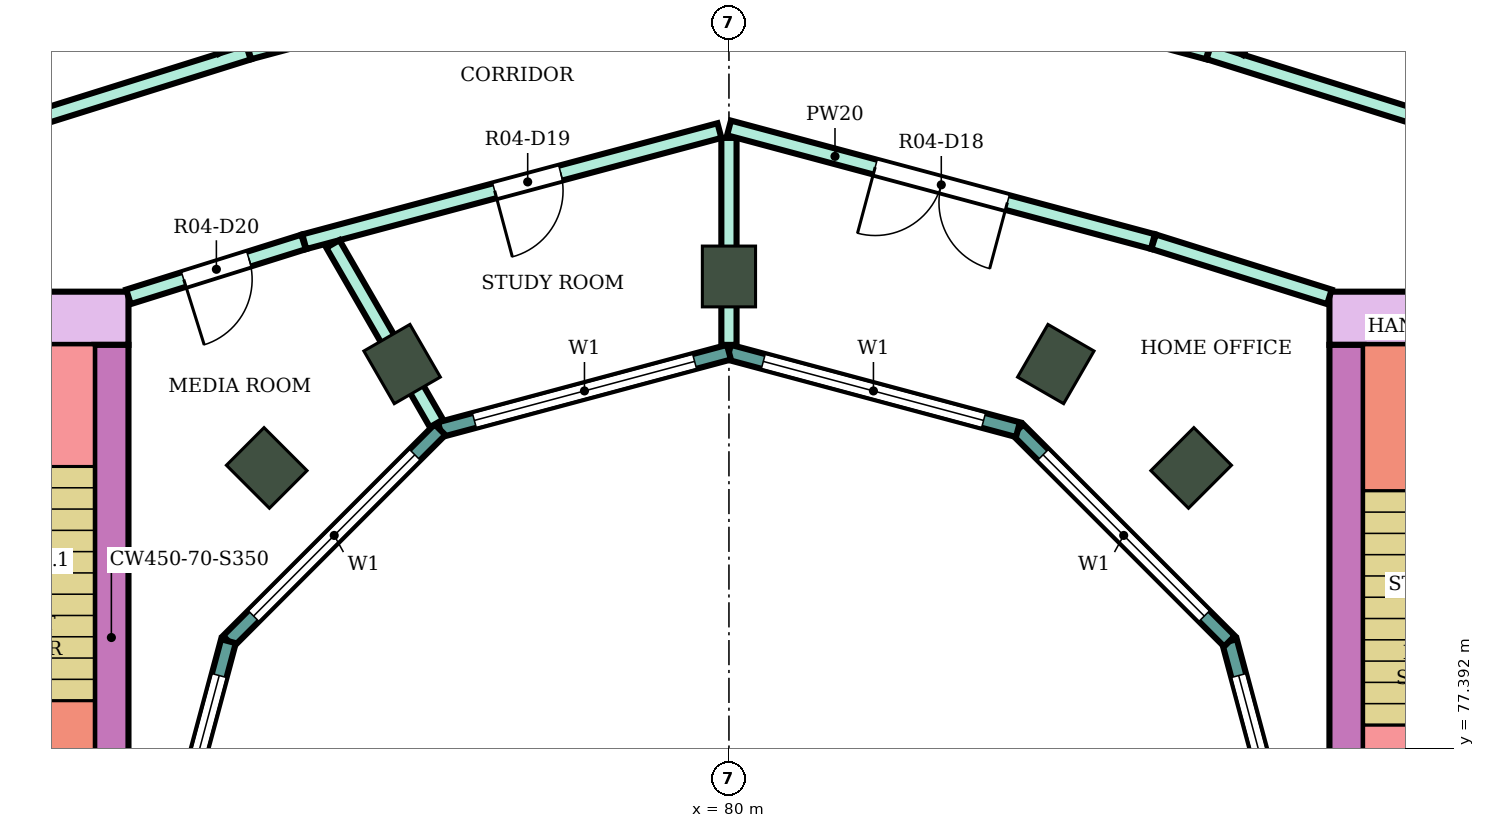
"""IFC4 building model, lengths in metres.
Left out: names, types, materials, properties, quantities, classifications, styles, units other than length and angle.
Written with IfcOpenShell. Run it as: python <this file> out.ifc"""

import sys

from ifc_helpers import new_model, si_unit, direction, frame, frame_2d, origin, origin_2d, place, context, subcontext, project, spatial, rectangle, extrude, element, fill, save


model = new_model("IFC4")
c1 = context("Model", 3, precision=1e-05, world=origin(), true_north=direction((0.0, 1.0)))
c2 = subcontext(c1, "Body", "Model", "MODEL_VIEW")
j1 = project(units=[si_unit("LENGTHUNIT", "METRE"), si_unit("PLANEANGLEUNIT", "RADIAN")], contexts=[c1])
p1 = place(None, origin())
s1 = spatial("IfcSite", under=j1, at=p1, CompositionType="ELEMENT")
p2 = place(p1, origin())
s2 = spatial("IfcBuilding", under=s1, at=p2, CompositionType="ELEMENT")
p3 = place(p2, frame((0.0, 0.0, 202.8)))
s3 = spatial("IfcBuildingStorey", under=s2, at=p3, CompositionType="ELEMENT", Elevation=202.8)
for number, where, z_axis, x_axis in (
    (1, (86.081, 81.081, 0.0), (0.0, 0.0, 1.0), (0.707, 0.707, 0.0)),
    (2, (84.3, 82.448, 0.0), (0.0, 0.0, 1.0), (0.5, 0.866, 0.0)),
    (3, (80.0, 83.6, 0.0), (0.0, 0.0, 1.0), (0.0, 1.0, 0.0)),
    (4, (75.7, 82.448, 0.0), (0.0, 0.0, 1.0), (-0.5, 0.866, 0.0)),
    (5, (73.919, 81.081, 0.0), (0.0, 0.0, 1.0), (-0.707, 0.707, 0.0)),
):
    element("IfcColumn", number, at=place(p3, frame(where, z_axis=z_axis, x_axis=x_axis)), inside=s3, PredefinedType="COLUMN", context=c2, shape_type="SweptSolid", body=[
        extrude(rectangle(XDim=0.8, YDim=0.7, at=origin_2d()), origin(), (0.0, 0.0, 1.0), 4.1),
    ])
p4 = place(p3, frame((87.9, 83.05, 0.0), z_axis=(0.0, 0.0, 1.0), x_axis=(1.0, 0.0, 0.0)))
e6 = element("IfcWall", 6, at=p4, inside=s3, PredefinedType="SHEAR", context=c2, shape_type="SweptSolid", body=[
    extrude(rectangle(XDim=14.8, YDim=0.7, at=frame_2d((7.4, 0.0))), origin(), (0.0, 0.0, 1.0), 3.75),
])
p5 = place(p4, frame((4.2, 0.0, 0.0)))
e7 = element("IfcOpeningElement", 7, at=p5, cuts=e6, PredefinedType="OPENING", context=c2, shape_type="SweptSolid", body=[
    extrude(rectangle(XDim=2.4, YDim=2.4, at=frame_2d((1.2, 1.2))), frame((0.0, 0.36, 0.0), z_axis=(0.0, -1.0, 0.0), x_axis=(1.0, 0.0, 0.0)), (0.0, 0.0, 1.0), 0.72),
])
p6 = place(p3, frame((88.125, 75.0, 0.0), z_axis=(0.0, 0.0, 1.0), x_axis=(0.0, 1.0, 0.0)))
e8 = element("IfcWall", 8, at=p6, inside=s3, PredefinedType="SHEAR", context=c2, shape_type="SweptSolid", body=[
    extrude(rectangle(XDim=7.7, YDim=0.45, at=frame_2d((3.85, 0.0))), origin(), (0.0, 0.0, 1.0), 3.75),
])
p7 = place(p3, frame((72.1, 83.05, 0.0), z_axis=(0.0, 0.0, 1.0), x_axis=(-1.0, 0.0, 0.0)))
e9 = element("IfcWall", 9, at=p7, inside=s3, PredefinedType="SHEAR", context=c2, shape_type="SweptSolid", body=[
    extrude(rectangle(XDim=14.8, YDim=0.7, at=frame_2d((7.4, 0.0))), origin(), (0.0, 0.0, 1.0), 3.75),
])
p8 = place(p7, frame((4.2, 0.0, 0.0)))
e10 = element("IfcOpeningElement", 10, at=p8, cuts=e9, PredefinedType="OPENING", context=c2, shape_type="SweptSolid", body=[
    extrude(rectangle(XDim=2.4, YDim=2.4, at=frame_2d((1.2, 1.2))), frame((0.0, 0.36, 0.0), z_axis=(0.0, -1.0, 0.0), x_axis=(1.0, 0.0, 0.0)), (0.0, 0.0, 1.0), 0.72),
])
p9 = place(p3, frame((71.875, 82.7, 0.0), z_axis=(0.0, 0.0, 1.0), x_axis=(0.0, -1.0, 0.0)))
e11 = element("IfcWall", 11, at=p9, inside=s3, PredefinedType="SHEAR", context=c2, shape_type="SweptSolid", body=[
    extrude(rectangle(XDim=7.7, YDim=0.45, at=frame_2d((3.85, 0.0))), origin(), (0.0, 0.0, 1.0), 3.75),
])
p10 = place(p3, frame((87.604, 75.0, 0.0), z_axis=(0.0, 0.0, 1.0), x_axis=(-0.258789828301, 0.965933654434, 0.0)))
e12 = element("IfcWall", 12, at=p10, inside=s3, PredefinedType="NOTDEFINED", context=c2, shape_type="SweptSolid", body=[
    extrude(rectangle(XDim=3.936, YDim=0.2, at=frame_2d((1.968, 0.0))), origin(), (0.0, 0.0, 1.0), 4.1),
])
p11 = place(p10, frame((0.468, 0.0, 0.9)))
e13 = element("IfcOpeningElement", 13, at=p11, cuts=e12, PredefinedType="OPENING", context=c2, shape_type="SweptSolid", body=[
    extrude(rectangle(XDim=3.0, YDim=2.3, at=frame_2d((1.5, 1.15))), frame((0.0, 0.11, 0.0), z_axis=(0.0, -1.0, 0.0), x_axis=(1.0, 0.0, 0.0)), (0.0, 0.0, 1.0), 0.22),
])
p12 = place(p3, frame((86.585, 78.802, 0.0), z_axis=(0.0, 0.0, 1.0), x_axis=(-0.707106781187, 0.707106781187, 0.0)))
e14 = element("IfcWall", 14, at=p12, inside=s3, PredefinedType="NOTDEFINED", context=c2, shape_type="SweptSolid", body=[
    extrude(rectangle(XDim=3.936, YDim=0.2, at=frame_2d((1.968, 0.0))), origin(), (0.0, 0.0, 1.0), 4.1),
])
p13 = place(p12, frame((0.468, 0.0, 0.9)))
e15 = element("IfcOpeningElement", 15, at=p13, cuts=e14, PredefinedType="OPENING", context=c2, shape_type="SweptSolid", body=[
    extrude(rectangle(XDim=3.0, YDim=2.3, at=frame_2d((1.5, 1.15))), frame((0.0, 0.11, 0.0), z_axis=(0.0, -1.0, 0.0), x_axis=(1.0, 0.0, 0.0)), (0.0, 0.0, 1.0), 0.22),
])
p14 = place(p3, frame((83.802, 81.585, 0.0), z_axis=(0.0, 0.0, 1.0), x_axis=(-0.965933654434, 0.258789828301, 0.0)))
e16 = element("IfcWall", 16, at=p14, inside=s3, PredefinedType="NOTDEFINED", context=c2, shape_type="SweptSolid", body=[
    extrude(rectangle(XDim=3.936, YDim=0.2, at=frame_2d((1.968, 0.0))), origin(), (0.0, 0.0, 1.0), 4.1),
])
p15 = place(p14, frame((0.468, 0.0, 0.9)))
e17 = element("IfcOpeningElement", 17, at=p15, cuts=e16, PredefinedType="OPENING", context=c2, shape_type="SweptSolid", body=[
    extrude(rectangle(XDim=3.0, YDim=2.3, at=frame_2d((1.5, 1.15))), frame((0.0, 0.11, 0.0), z_axis=(0.0, -1.0, 0.0), x_axis=(1.0, 0.0, 0.0)), (0.0, 0.0, 1.0), 0.22),
])
p16 = place(p3, frame((80.0, 82.604, 0.0), z_axis=(0.0, 0.0, 1.0), x_axis=(-0.965933654434, -0.258789828301, 0.0)))
e18 = element("IfcWall", 18, at=p16, inside=s3, PredefinedType="NOTDEFINED", context=c2, shape_type="SweptSolid", body=[
    extrude(rectangle(XDim=3.936, YDim=0.2, at=frame_2d((1.968, 0.0))), origin(), (0.0, 0.0, 1.0), 4.1),
])
p17 = place(p16, frame((0.468, 0.0, 0.9)))
e19 = element("IfcOpeningElement", 19, at=p17, cuts=e18, PredefinedType="OPENING", context=c2, shape_type="SweptSolid", body=[
    extrude(rectangle(XDim=3.0, YDim=2.3, at=frame_2d((1.5, 1.15))), frame((0.0, 0.11, 0.0), z_axis=(0.0, -1.0, 0.0), x_axis=(1.0, 0.0, 0.0)), (0.0, 0.0, 1.0), 0.22),
])
p18 = place(p3, frame((76.198, 81.585, 0.0), z_axis=(0.0, 0.0, 1.0), x_axis=(-0.707106781187, -0.707106781187, 0.0)))
e20 = element("IfcWall", 20, at=p18, inside=s3, PredefinedType="NOTDEFINED", context=c2, shape_type="SweptSolid", body=[
    extrude(rectangle(XDim=3.936, YDim=0.2, at=frame_2d((1.968, 0.0))), origin(), (0.0, 0.0, 1.0), 4.1),
])
p19 = place(p18, frame((0.468, 0.0, 0.9)))
e21 = element("IfcOpeningElement", 21, at=p19, cuts=e20, PredefinedType="OPENING", context=c2, shape_type="SweptSolid", body=[
    extrude(rectangle(XDim=3.0, YDim=2.3, at=frame_2d((1.5, 1.15))), frame((0.0, 0.11, 0.0), z_axis=(0.0, -1.0, 0.0), x_axis=(1.0, 0.0, 0.0)), (0.0, 0.0, 1.0), 0.22),
])
p20 = place(p3, frame((73.415, 78.802, 0.0), z_axis=(0.0, 0.0, 1.0), x_axis=(-0.258789828301, -0.965933654434, 0.0)))
e22 = element("IfcWall", 22, at=p20, inside=s3, PredefinedType="NOTDEFINED", context=c2, shape_type="SweptSolid", body=[
    extrude(rectangle(XDim=3.936, YDim=0.2, at=frame_2d((1.968, 0.0))), origin(), (0.0, 0.0, 1.0), 4.1),
])
p21 = place(p20, frame((0.468, 0.0, 0.9)))
e23 = element("IfcOpeningElement", 23, at=p21, cuts=e22, PredefinedType="OPENING", context=c2, shape_type="SweptSolid", body=[
    extrude(rectangle(XDim=3.0, YDim=2.3, at=frame_2d((1.5, 1.15))), frame((0.0, 0.11, 0.0), z_axis=(0.0, -1.0, 0.0), x_axis=(1.0, 0.0, 0.0)), (0.0, 0.0, 1.0), 0.22),
])
p22 = place(p3, frame((68.2, 84.834, 0.0), z_axis=(0.0, 0.0, 1.0), x_axis=(0.954272398161, 0.298938438661, 0.0)))
e24 = element("IfcWall", 24, at=p22, inside=s3, PredefinedType="PARTITIONING", context=c2, shape_type="SweptSolid", body=[
    extrude(rectangle(XDim=5.74, YDim=0.2, at=frame_2d((2.87, 0.0))), origin(), (0.0, 0.0, 1.0), 3.65),
])
p23 = place(p3, frame((72.1, 83.332, 0.0), z_axis=(0.0, 0.0, 1.0), x_axis=(0.954233106619, 0.299063836383, 0.0)))
e25 = element("IfcWall", 25, at=p23, inside=s3, PredefinedType="PARTITIONING", context=c2, shape_type="SweptSolid", body=[
    extrude(rectangle(XDim=2.414, YDim=0.2, at=frame_2d((1.207, 0.0))), origin(), (0.0, 0.0, 1.0), 3.65),
])
p24 = place(p23, frame((0.762, 0.0, 0.0)))
e26 = element("IfcOpeningElement", 26, at=p24, cuts=e25, PredefinedType="OPENING", context=c2, shape_type="SweptSolid", body=[
    extrude(rectangle(XDim=0.9, YDim=2.1, at=frame_2d((0.45, 1.05))), frame((0.0, 0.11, 0.0), z_axis=(0.0, -1.0, 0.0), x_axis=(1.0, 0.0, 0.0)), (0.0, 0.0, 1.0), 0.22),
])
p25 = place(p3, frame((73.687, 86.554, 0.0), z_axis=(0.0, 0.0, 1.0), x_axis=(0.96595258731, 0.258719150952, 0.0)))
e27 = element("IfcWall", 27, at=p25, inside=s3, PredefinedType="PARTITIONING", context=c2, shape_type="SweptSolid", body=[
    extrude(rectangle(XDim=6.486, YDim=0.2, at=frame_2d((3.243, 0.0))), origin(), (0.0, 0.0, 1.0), 3.65),
])
p26 = place(p25, frame((0.55, 0.0, 0.0)))
e28 = element("IfcOpeningElement", 28, at=p26, cuts=e27, PredefinedType="OPENING", context=c2, shape_type="SweptSolid", body=[
    extrude(rectangle(XDim=1.0, YDim=2.1, at=frame_2d((0.5, 1.05))), frame((0.0, 0.11, 0.0), z_axis=(0.0, -1.0, 0.0), x_axis=(1.0, 0.0, 0.0)), (0.0, 0.0, 1.0), 0.22),
])
p27 = place(p3, frame((74.413, 84.057, 0.0), z_axis=(0.0, 0.0, 1.0), x_axis=(0.965972135939, 0.258646153246, 0.0)))
e29 = element("IfcWall", 29, at=p27, inside=s3, PredefinedType="PARTITIONING", context=c2, shape_type="SweptSolid", body=[
    extrude(rectangle(XDim=5.654, YDim=0.2, at=frame_2d((2.827, 0.0))), origin(), (0.0, 0.0, 1.0), 3.65),
])
p28 = place(p27, frame((2.593, 0.0, 0.0)))
e30 = element("IfcOpeningElement", 30, at=p28, cuts=e29, PredefinedType="OPENING", context=c2, shape_type="SweptSolid", body=[
    extrude(rectangle(XDim=0.9, YDim=2.1, at=frame_2d((0.45, 1.05))), frame((0.0, 0.11, 0.0), z_axis=(0.0, -1.0, 0.0), x_axis=(1.0, 0.0, 0.0)), (0.0, 0.0, 1.0), 0.22),
])
p29 = place(p3, frame((74.789, 84.028, 0.0), z_axis=(0.0, 0.0, 1.0), x_axis=(0.49993436518, -0.866063294749, 0.0)))
e31 = element("IfcWall", 31, at=p29, inside=s3, PredefinedType="PARTITIONING", context=c2, shape_type="SweptSolid", body=[
    extrude(rectangle(XDim=2.726, YDim=0.2, at=frame_2d((1.363, 0.0))), origin(), (0.0, 0.0, 1.0), 3.65),
])
p30 = place(p3, frame((80.0, 82.7, 0.0), z_axis=(0.0, 0.0, 1.0), x_axis=(0.0, 1.0, 0.0)))
e32 = element("IfcWall", 32, at=p30, inside=s3, PredefinedType="PARTITIONING", context=c2, shape_type="SweptSolid", body=[
    extrude(rectangle(XDim=2.723, YDim=0.2, at=frame_2d((1.362, 0.0))), origin(), (0.0, 0.0, 1.0), 3.65),
])
p31 = place(p3, frame((80.048, 88.233, 0.0), z_axis=(0.0, 0.0, 1.0), x_axis=(0.965787353661, -0.259335280109, 0.0)))
e33 = element("IfcWall", 33, at=p31, inside=s3, PredefinedType="PARTITIONING", context=c2, shape_type="SweptSolid", body=[
    extrude(rectangle(XDim=6.476, YDim=0.2, at=frame_2d((3.238, 0.0))), origin(), (0.0, 0.0, 1.0), 3.65),
])
p32 = place(p31, frame((4.936, 0.0, 0.0)))
e34 = element("IfcOpeningElement", 34, at=p32, cuts=e33, PredefinedType="OPENING", context=c2, shape_type="SweptSolid", body=[
    extrude(rectangle(XDim=1.0, YDim=2.1, at=frame_2d((0.5, 1.05))), frame((0.0, 0.11, 0.0), z_axis=(0.0, -1.0, 0.0), x_axis=(1.0, 0.0, 0.0)), (0.0, 0.0, 1.0), 0.22),
])
p33 = place(p3, frame((80.001, 85.554, 0.0), z_axis=(0.0, 0.0, 1.0), x_axis=(0.965917658836, -0.258849524528, 0.0)))
e35 = element("IfcWall", 35, at=p33, inside=s3, PredefinedType="PARTITIONING", context=c2, shape_type="SweptSolid", body=[
    extrude(rectangle(XDim=5.773, YDim=0.2, at=frame_2d((2.887, 0.0))), origin(), (0.0, 0.0, 1.0), 3.65),
])
p34 = place(p33, frame((1.991, 0.0, 0.0)))
e36 = element("IfcOpeningElement", 36, at=p34, cuts=e35, PredefinedType="OPENING", context=c2, shape_type="SweptSolid", body=[
    extrude(rectangle(XDim=1.8, YDim=2.1, at=frame_2d((0.9, 1.05))), frame((0.0, 0.11, 0.0), z_axis=(0.0, -1.0, 0.0), x_axis=(1.0, 0.0, 0.0)), (0.0, 0.0, 1.0), 0.22),
])
p35 = place(p3, frame((85.587, 84.057, 0.0), z_axis=(0.0, 0.0, 1.0), x_axis=(0.954210767728, -0.299135104513, 0.0)))
e37 = element("IfcWall", 37, at=p35, inside=s3, PredefinedType="PARTITIONING", context=c2, shape_type="SweptSolid", body=[
    extrude(rectangle(XDim=2.424, YDim=0.2, at=frame_2d((1.212, 0.0))), origin(), (0.0, 0.0, 1.0), 3.65),
])
p36 = place(p3, frame((86.313, 86.554, 0.0), z_axis=(0.0, 0.0, 1.0), x_axis=(0.954081217458, -0.299548043717, 0.0)))
e38 = element("IfcWall", 38, at=p36, inside=s3, PredefinedType="PARTITIONING", context=c2, shape_type="SweptSolid", body=[
    extrude(rectangle(XDim=5.721, YDim=0.2, at=frame_2d((2.86, 0.0))), origin(), (0.0, 0.0, 1.0), 3.65),
])
p37 = place(p3, frame((86.676, 86.563, 0.0), z_axis=(0.0, 0.0, 1.0), x_axis=(0.500124310661, 0.865953621094, 0.0)))
e39 = element("IfcWall", 39, at=p37, inside=s3, PredefinedType="PARTITIONING", context=c2, shape_type="SweptSolid", body=[
    extrude(rectangle(XDim=12.446, YDim=0.2, at=frame_2d((6.223, 0.0))), origin(), (0.0, 0.0, 1.0), 3.65),
])
p38 = place(p3, frame((67.101, 97.342, 0.0), z_axis=(0.0, 0.0, 1.0), x_axis=(0.499944152966, -0.866057644684, 0.0)))
e40 = element("IfcWall", 40, at=p38, inside=s3, PredefinedType="PARTITIONING", context=c2, shape_type="SweptSolid", body=[
    extrude(rectangle(XDim=12.456, YDim=0.1, at=frame_2d((6.228, 0.0))), origin(), (0.0, 0.0, 1.0), 3.65),
])
p39 = place(p38, frame((2.486, 0.0, 0.0)))
e41 = element("IfcOpeningElement", 41, at=p39, cuts=e40, PredefinedType="OPENING", context=c2, shape_type="SweptSolid", body=[
    extrude(rectangle(XDim=0.9, YDim=2.1, at=frame_2d((0.45, 1.05))), frame((0.0, 0.06, 0.0), z_axis=(0.0, -1.0, 0.0), x_axis=(1.0, 0.0, 0.0)), (0.0, 0.0, 1.0), 0.12),
])
p40 = place(p38, frame((9.85, 0.0, 0.0)))
e42 = element("IfcOpeningElement", 42, at=p40, cuts=e40, PredefinedType="OPENING", context=c2, shape_type="SweptSolid", body=[
    extrude(rectangle(XDim=0.8, YDim=2.1, at=frame_2d((0.4, 1.05))), frame((0.0, 0.06, 0.0), z_axis=(0.0, -1.0, 0.0), x_axis=(1.0, 0.0, 0.0)), (0.0, 0.0, 1.0), 0.12),
])
p41 = place(p11, origin())
e43 = element("IfcWindow", 43, at=p41, inside=s3, PartitioningType="SINGLE_PANEL", PredefinedType="WINDOW", context=c2, shape_type="SweptSolid", body=[
    extrude(rectangle(XDim=3.0, YDim=2.3, at=frame_2d((1.5, 1.15))), frame((0.0, 0.03, 0.0), z_axis=(0.0, -1.0, 0.0), x_axis=(1.0, 0.0, 0.0)), (0.0, 0.0, 1.0), 0.06),
])
fill(e13, e43)
p42 = place(p13, origin())
e44 = element("IfcWindow", 44, at=p42, inside=s3, PartitioningType="SINGLE_PANEL", PredefinedType="WINDOW", context=c2, shape_type="SweptSolid", body=[
    extrude(rectangle(XDim=3.0, YDim=2.3, at=frame_2d((1.5, 1.15))), frame((0.0, 0.03, 0.0), z_axis=(0.0, -1.0, 0.0), x_axis=(1.0, 0.0, 0.0)), (0.0, 0.0, 1.0), 0.06),
])
fill(e15, e44)
p43 = place(p15, origin())
e45 = element("IfcWindow", 45, at=p43, inside=s3, PartitioningType="SINGLE_PANEL", PredefinedType="WINDOW", context=c2, shape_type="SweptSolid", body=[
    extrude(rectangle(XDim=3.0, YDim=2.3, at=frame_2d((1.5, 1.15))), frame((0.0, 0.03, 0.0), z_axis=(0.0, -1.0, 0.0), x_axis=(1.0, 0.0, 0.0)), (0.0, 0.0, 1.0), 0.06),
])
fill(e17, e45)
p44 = place(p17, origin())
e46 = element("IfcWindow", 46, at=p44, inside=s3, PartitioningType="SINGLE_PANEL", PredefinedType="WINDOW", context=c2, shape_type="SweptSolid", body=[
    extrude(rectangle(XDim=3.0, YDim=2.3, at=frame_2d((1.5, 1.15))), frame((0.0, 0.03, 0.0), z_axis=(0.0, -1.0, 0.0), x_axis=(1.0, 0.0, 0.0)), (0.0, 0.0, 1.0), 0.06),
])
fill(e19, e46)
p45 = place(p19, origin())
e47 = element("IfcWindow", 47, at=p45, inside=s3, PartitioningType="SINGLE_PANEL", PredefinedType="WINDOW", context=c2, shape_type="SweptSolid", body=[
    extrude(rectangle(XDim=3.0, YDim=2.3, at=frame_2d((1.5, 1.15))), frame((0.0, 0.03, 0.0), z_axis=(0.0, -1.0, 0.0), x_axis=(1.0, 0.0, 0.0)), (0.0, 0.0, 1.0), 0.06),
])
fill(e21, e47)
p46 = place(p21, origin())
e48 = element("IfcWindow", 48, at=p46, inside=s3, PartitioningType="SINGLE_PANEL", PredefinedType="WINDOW", context=c2, shape_type="SweptSolid", body=[
    extrude(rectangle(XDim=3.0, YDim=2.3, at=frame_2d((1.5, 1.15))), frame((0.0, 0.03, 0.0), z_axis=(0.0, -1.0, 0.0), x_axis=(1.0, 0.0, 0.0)), (0.0, 0.0, 1.0), 0.06),
])
fill(e23, e48)
p47 = place(p34, frame((1.8, 0.0, 0.0), z_axis=(0.0, 0.0, 1.0), x_axis=(-1.0, 0.0, 0.0)))
e49 = element("IfcDoor", 49, at=p47, inside=s3, OperationType="DOUBLE_DOOR_SINGLE_SWING", PredefinedType="DOOR", context=c2, shape_type="SweptSolid", body=[
    extrude(rectangle(XDim=1.8, YDim=2.1, at=frame_2d((0.9, 1.05))), frame((0.0, 0.025, 0.0), z_axis=(0.0, -1.0, 0.0), x_axis=(1.0, 0.0, 0.0)), (0.0, 0.0, 1.0), 0.05),
])
fill(e36, e49)
p48 = place(p28, frame((0.9, 0.0, 0.0), z_axis=(0.0, 0.0, 1.0), x_axis=(-1.0, 0.0, 0.0)))
e50 = element("IfcDoor", 50, at=p48, inside=s3, OperationType="SINGLE_SWING_RIGHT", PredefinedType="DOOR", context=c2, shape_type="SweptSolid", body=[
    extrude(rectangle(XDim=0.9, YDim=2.1, at=frame_2d((0.45, 1.05))), frame((0.0, 0.025, 0.0), z_axis=(0.0, -1.0, 0.0), x_axis=(1.0, 0.0, 0.0)), (0.0, 0.0, 1.0), 0.05),
])
fill(e30, e50)
p49 = place(p24, frame((0.9, 0.0, 0.0), z_axis=(0.0, 0.0, 1.0), x_axis=(-1.0, 0.0, 0.0)))
e51 = element("IfcDoor", 51, at=p49, inside=s3, OperationType="SINGLE_SWING_RIGHT", PredefinedType="DOOR", context=c2, shape_type="SweptSolid", body=[
    extrude(rectangle(XDim=0.9, YDim=2.1, at=frame_2d((0.45, 1.05))), frame((0.0, 0.025, 0.0), z_axis=(0.0, -1.0, 0.0), x_axis=(1.0, 0.0, 0.0)), (0.0, 0.0, 1.0), 0.05),
])
fill(e26, e51)
save(model, sys.argv[1])
